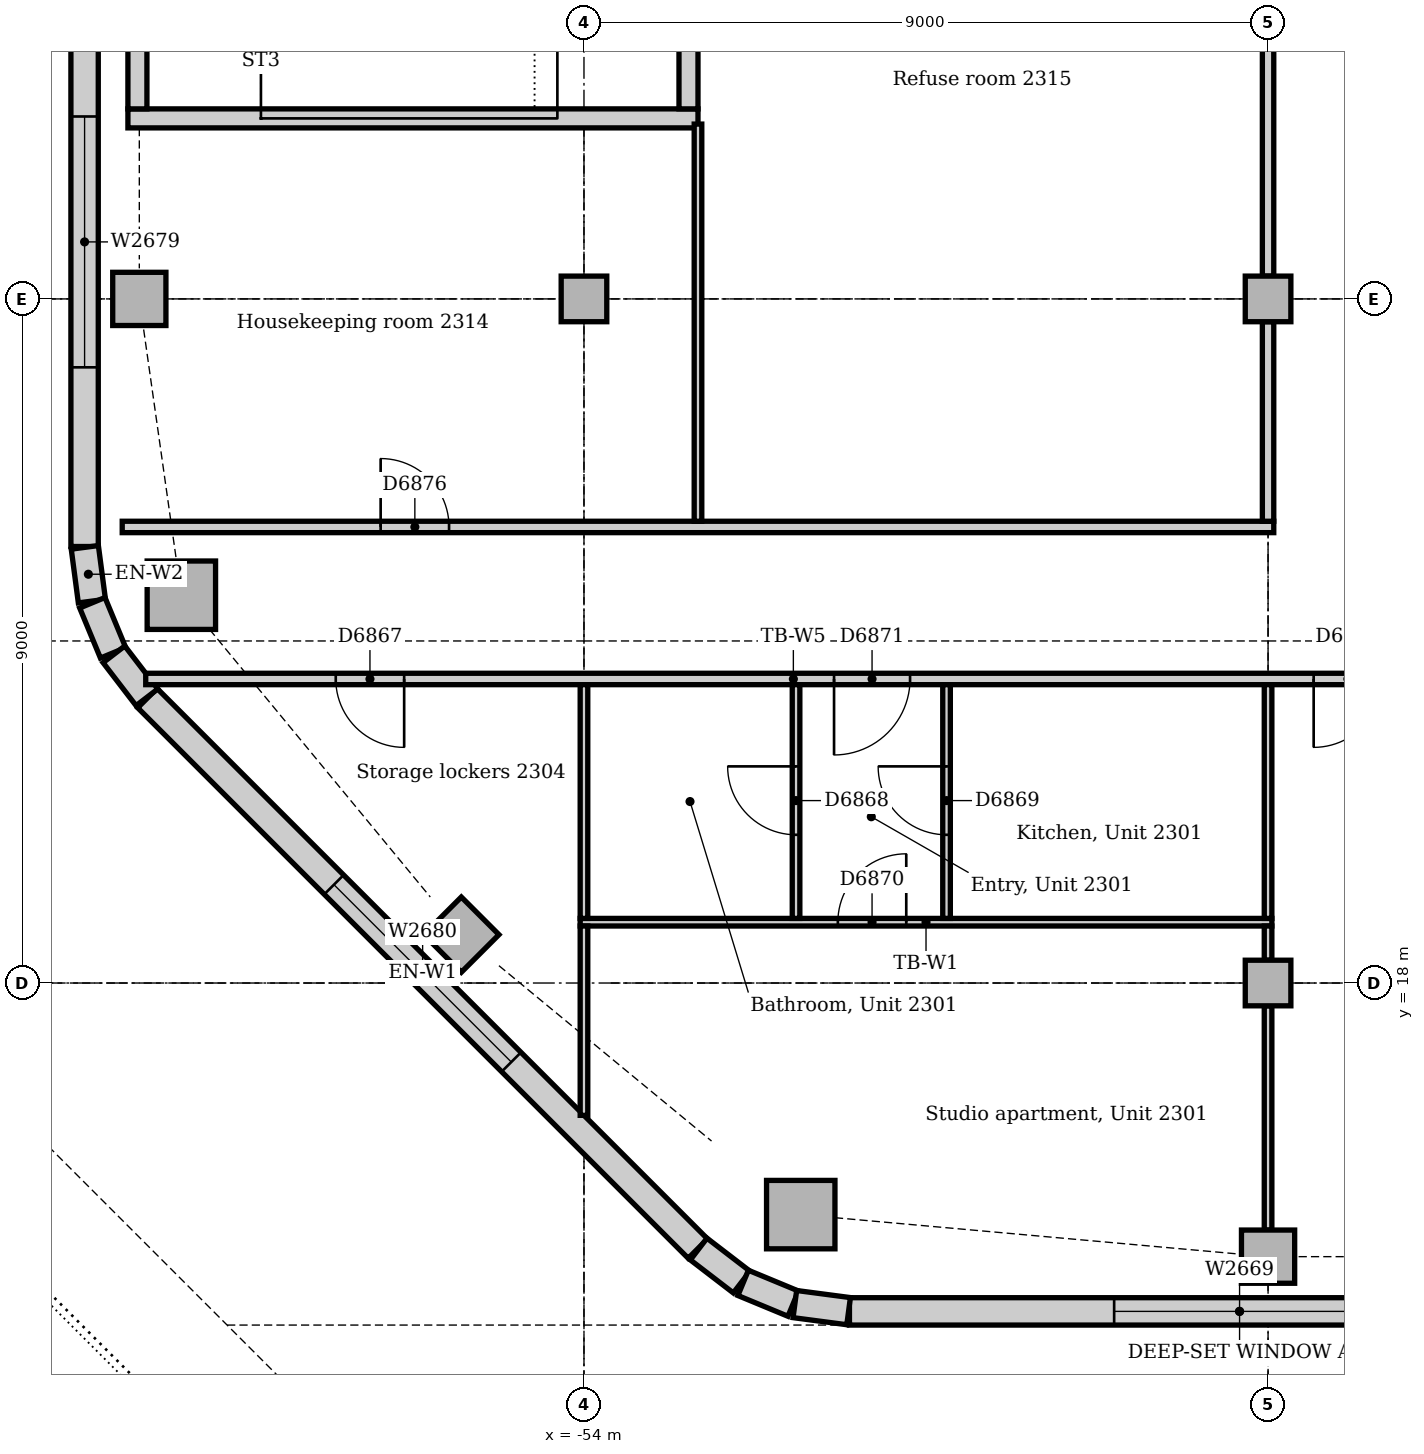
"""IFC4 building model, lengths in metres.
Left out: names, types, materials, properties, quantities, classifications, styles, units other than length and angle.
Written with IfcOpenShell. Run it as: python <this file> out.ifc"""

import sys

from ifc_helpers import new_model, si_unit, direction, frame, frame_2d, origin, origin_2d, place, context, subcontext, project, spatial, rectangle, extrude, element, fill, save


model = new_model("IFC4")
c1 = context("Model", 3, precision=1e-05, world=origin(), true_north=direction((0.0, 1.0)))
c2 = subcontext(c1, "Body", "Model", "MODEL_VIEW")
j1 = project(units=[si_unit("LENGTHUNIT", "METRE"), si_unit("PLANEANGLEUNIT", "RADIAN")], contexts=[c1])
p1 = place(None, origin())
s1 = spatial("IfcSite", under=j1, at=p1, CompositionType="ELEMENT")
p2 = place(p1, origin())
s2 = spatial("IfcBuilding", under=s1, at=p2, CompositionType="ELEMENT")
p3 = place(p2, frame((0.0, 0.0, 100.0)))
s3 = spatial("IfcBuildingStorey", under=s2, at=p3, CompositionType="ELEMENT", Elevation=100.0)
p4 = place(p3, frame((-60.0, 29.375, 0.0), z_axis=(0.0, 0.0, 1.0), x_axis=(1.0, 0.0, 0.0)))
e1 = element("IfcWall", 1, at=p4, inside=s3, PredefinedType="SOLIDWALL", context=c2, shape_type="SweptSolid", body=[
    extrude(rectangle(XDim=7.5, YDim=0.25, at=frame_2d((3.75, 0.0))), origin(), (0.0, 0.0, 1.0), 4.0),
])
for number, where, z_axis, x_axis in (
    (2, (-52.625, 29.5, 0.0), (0.0, 0.0, 1.0), (0.0, 1.0, 0.0)),
    (3, (-59.875, 33.5, 0.0), (0.0, 0.0, 1.0), (0.0, -1.0, 0.0)),
):
    element("IfcWall", number, at=place(p3, frame(where, z_axis=z_axis, x_axis=x_axis)), inside=s3, PredefinedType="SOLIDWALL", context=c2, shape_type="SweptSolid", body=[
        extrude(rectangle(XDim=4.0, YDim=0.25, at=frame_2d((2.0, 0.0))), origin(), (0.0, 0.0, 1.0), 4.0),
    ])
for number, where, z_axis, x_axis in (
    (4, (-51.148, 14.953, -0.15), (0.0, 0.0, 1.0), (1.0, 0.0, 0.0)),
    (5, (-59.297, 23.102, -0.15), (0.0, 0.0, 1.0), (1.0, 0.0, 0.0)),
):
    element("IfcColumn", number, at=place(p3, frame(where, z_axis=z_axis, x_axis=x_axis)), inside=s3, PredefinedType="COLUMN", context=c2, shape_type="SweptSolid", body=[
        extrude(rectangle(XDim=0.9, YDim=0.9, at=origin_2d()), origin(), (0.0, 0.0, 1.0), 4.0),
    ])
for number, where, z_axis, x_axis in (
    (6, (-45.0, 14.4, -0.15), (0.0, 0.0, 1.0), (1.0, 0.0, 0.0)),
    (7, (-59.85, 27.0, -0.15), (0.0, 0.0, 1.0), (1.0, 0.0, 0.0)),
    (8, (-55.614, 18.636, -0.15), (0.0, 0.0, 1.0), (0.707, 0.707, 0.0)),
):
    element("IfcColumn", number, at=place(p3, frame(where, z_axis=z_axis, x_axis=x_axis)), inside=s3, PredefinedType="COLUMN", context=c2, shape_type="SweptSolid", body=[
        extrude(rectangle(XDim=0.7, YDim=0.7, at=origin_2d()), origin(), (0.0, 0.0, 1.0), 4.0),
    ])
for number, where, z_axis, x_axis in (
    (9, (-54.0, 27.0, 0.0), (0.0, 0.0, 1.0), (1.0, 0.0, 0.0)),
    (10, (-45.0, 18.0, 0.0), (0.0, 0.0, 1.0), (1.0, 0.0, 0.0)),
    (11, (-45.0, 27.0, 0.0), (0.0, 0.0, 1.0), (1.0, 0.0, 0.0)),
):
    element("IfcColumn", number, at=place(p3, frame(where, z_axis=z_axis, x_axis=x_axis)), inside=s3, PredefinedType="COLUMN", context=c2, shape_type="SweptSolid", body=[
        extrude(rectangle(XDim=0.6, YDim=0.6, at=origin_2d()), origin(), (0.0, 0.0, 1.0), 3.85),
    ])
p5 = place(p3, frame((-50.507, 13.68, 0.0), z_axis=(0.0, 0.0, 1.0), x_axis=(1.0, 0.0, 0.0)))
e12 = element("IfcWall", 12, at=p5, inside=s3, PredefinedType="STANDARD", context=c2, shape_type="SweptSolid", body=[
    extrude(rectangle(XDim=19.265, YDim=0.36, at=frame_2d((9.632, 0.0))), origin(), (0.0, 0.0, 1.0), 3.85),
])
p6 = place(p5, frame((3.482, 0.0, 0.9)))
e13 = element("IfcOpeningElement", 13, at=p6, cuts=e12, PredefinedType="OPENING", context=c2, shape_type="SweptSolid", body=[
    extrude(rectangle(XDim=3.3, YDim=1.6, at=frame_2d((1.65, 0.8))), frame((0.0, 0.19, 0.0), z_axis=(0.0, -1.0, 0.0), x_axis=(1.0, 0.0, 0.0)), (0.0, 0.0, 1.0), 0.38),
])
p7 = place(p5, frame((8.732, 0.0, 0.0)))
e14 = element("IfcOpeningElement", 14, at=p7, cuts=e12, PredefinedType="OPENING", context=c2, shape_type="SweptSolid", body=[
    extrude(rectangle(XDim=1.8, YDim=2.4, at=frame_2d((0.9, 1.2))), frame((0.0, 0.19, 0.0), z_axis=(0.0, -1.0, 0.0), x_axis=(1.0, 0.0, 0.0)), (0.0, 0.0, 1.0), 0.38),
])
p8 = place(p5, frame((12.482, 0.0, 0.9)))
e15 = element("IfcOpeningElement", 15, at=p8, cuts=e12, PredefinedType="OPENING", context=c2, shape_type="SweptSolid", body=[
    extrude(rectangle(XDim=3.3, YDim=1.6, at=frame_2d((1.65, 0.8))), frame((0.0, 0.19, 0.0), z_axis=(0.0, -1.0, 0.0), x_axis=(1.0, 0.0, 0.0)), (0.0, 0.0, 1.0), 0.38),
])
p9 = place(p3, frame((-60.57, 45.257, 0.0), z_axis=(0.0, 0.0, 1.0), x_axis=(0.0, -1.0, 0.0)))
e16 = element("IfcWall", 16, at=p9, inside=s3, PredefinedType="STANDARD", context=c2, shape_type="SweptSolid", body=[
    extrude(rectangle(XDim=21.515, YDim=0.36, at=frame_2d((10.757, 0.0))), origin(), (0.0, 0.0, 1.0), 3.85),
])
p10 = place(p9, frame((3.107, 0.0, 0.0)))
e17 = element("IfcOpeningElement", 17, at=p10, cuts=e16, PredefinedType="OPENING", context=c2, shape_type="SweptSolid", body=[
    extrude(rectangle(XDim=1.8, YDim=2.4, at=frame_2d((0.9, 1.2))), frame((0.0, 0.19, 0.0), z_axis=(0.0, -1.0, 0.0), x_axis=(1.0, 0.0, 0.0)), (0.0, 0.0, 1.0), 0.38),
])
p11 = place(p9, frame((6.857, 0.0, 0.9)))
e18 = element("IfcOpeningElement", 18, at=p11, cuts=e16, PredefinedType="OPENING", context=c2, shape_type="SweptSolid", body=[
    extrude(rectangle(XDim=3.3, YDim=1.6, at=frame_2d((1.65, 0.8))), frame((0.0, 0.19, 0.0), z_axis=(0.0, -1.0, 0.0), x_axis=(1.0, 0.0, 0.0)), (0.0, 0.0, 1.0), 0.38),
])
p12 = place(p9, frame((11.357, 0.0, 0.9)))
e19 = element("IfcOpeningElement", 19, at=p12, cuts=e16, PredefinedType="OPENING", context=c2, shape_type="SweptSolid", body=[
    extrude(rectangle(XDim=3.3, YDim=1.6, at=frame_2d((1.65, 0.8))), frame((0.0, 0.19, 0.0), z_axis=(0.0, -1.0, 0.0), x_axis=(1.0, 0.0, 0.0)), (0.0, 0.0, 1.0), 0.38),
])
p13 = place(p9, frame((15.857, 0.0, 0.9)))
e20 = element("IfcOpeningElement", 20, at=p13, cuts=e16, PredefinedType="OPENING", context=c2, shape_type="SweptSolid", body=[
    extrude(rectangle(XDim=3.3, YDim=1.6, at=frame_2d((1.65, 0.8))), frame((0.0, 0.19, 0.0), z_axis=(0.0, -1.0, 0.0), x_axis=(1.0, 0.0, 0.0)), (0.0, 0.0, 1.0), 0.38),
])
p14 = place(p3, frame((-59.744, 21.749, 0.0), z_axis=(0.0, 0.0, 1.0), x_axis=(0.707106781187, -0.707106781187, 0.0)))
e21 = element("IfcWall", 21, at=p14, inside=s3, PredefinedType="STANDARD", context=c2, shape_type="SweptSolid", body=[
    extrude(rectangle(XDim=10.243, YDim=0.36, at=frame_2d((5.121, 0.0))), origin(), (0.0, 0.0, 1.0), 3.85),
])
p15 = place(p14, frame((3.471, 0.0, 0.9)))
e22 = element("IfcOpeningElement", 22, at=p15, cuts=e21, PredefinedType="OPENING", context=c2, shape_type="SweptSolid", body=[
    extrude(rectangle(XDim=3.3, YDim=1.6, at=frame_2d((1.65, 0.8))), frame((0.0, 0.19, 0.0), z_axis=(0.0, -1.0, 0.0), x_axis=(1.0, 0.0, 0.0)), (0.0, 0.0, 1.0), 0.38),
])
for number, where, z_axis, x_axis in (
    (23, (-60.567, 23.731, 0.0), (0.0, 0.0, 1.0), (0.131, -0.991, 0.0)),
    (24, (-60.468, 23.003, 0.0), (0.0, 0.0, 1.0), (0.383, -0.924, 0.0)),
):
    element("IfcWall", number, at=place(p3, frame(where, z_axis=z_axis, x_axis=x_axis)), inside=s3, PredefinedType="STANDARD", context=c2, shape_type="SweptSolid", body=[
        extrude(rectangle(XDim=0.713, YDim=0.36, at=frame_2d((0.356, 0.0))), origin(), (0.0, 0.0, 1.0), 3.85),
    ])
for number, where, z_axis, x_axis in (
    (25, (-60.184, 22.325, 0.0), (0.0, 0.0, 1.0), (0.609, -0.793, 0.0)),
    (26, (-52.491, 14.5, 0.0), (0.0, 0.0, 1.0), (0.793, -0.609, 0.0)),
):
    element("IfcWall", number, at=place(p3, frame(where, z_axis=z_axis, x_axis=x_axis)), inside=s3, PredefinedType="STANDARD", context=c2, shape_type="SweptSolid", body=[
        extrude(rectangle(XDim=0.713, YDim=0.36, at=frame_2d((0.357, 0.0))), origin(), (0.0, 0.0, 1.0), 3.85),
    ])
for number, where, z_axis, x_axis in (
    (27, (-51.906, 14.055, 0.0), (0.0, 0.0, 1.0), (0.924, -0.383, 0.0)),
    (28, (-51.226, 13.776, 0.0), (0.0, 0.0, 1.0), (0.991, -0.131, 0.0)),
):
    element("IfcWall", number, at=place(p3, frame(where, z_axis=z_axis, x_axis=x_axis)), inside=s3, PredefinedType="STANDARD", context=c2, shape_type="SweptSolid", body=[
        extrude(rectangle(XDim=0.713, YDim=0.36, at=frame_2d((0.356, 0.0))), origin(), (0.0, 0.0, 1.0), 3.85),
    ])
p16 = place(p3, frame((-59.766, 22.0, 0.0), z_axis=(0.0, 0.0, 1.0), x_axis=(1.0, 0.0, 0.0)))
e29 = element("IfcWall", 29, at=p16, inside=s3, PredefinedType="PARTITIONING", context=c2, shape_type="SweptSolid", body=[
    extrude(rectangle(XDim=17.041, YDim=0.15, at=frame_2d((8.52, 0.0))), origin(), (0.0, 0.0, 1.0), 3.85),
])
p17 = place(p16, frame((15.366, 0.0, 0.0)))
e30 = element("IfcOpeningElement", 30, at=p17, cuts=e29, PredefinedType="OPENING", context=c2, shape_type="SweptSolid", body=[
    extrude(rectangle(XDim=0.9, YDim=2.1, at=frame_2d((0.45, 1.05))), frame((0.0, 0.085, 0.0), z_axis=(0.0, -1.0, 0.0), x_axis=(1.0, 0.0, 0.0)), (0.0, 0.0, 1.0), 0.17),
])
p18 = place(p16, frame((2.5, 0.0, 0.0)))
e31 = element("IfcOpeningElement", 31, at=p18, cuts=e29, PredefinedType="OPENING", context=c2, shape_type="SweptSolid", body=[
    extrude(rectangle(XDim=0.9, YDim=2.1, at=frame_2d((0.45, 1.05))), frame((0.0, 0.085, 0.0), z_axis=(0.0, -1.0, 0.0), x_axis=(1.0, 0.0, 0.0)), (0.0, 0.0, 1.0), 0.17),
])
p19 = place(p16, frame((9.056, 0.0, 0.0)))
e32 = element("IfcOpeningElement", 32, at=p19, cuts=e29, PredefinedType="OPENING", context=c2, shape_type="SweptSolid", body=[
    extrude(rectangle(XDim=1.0, YDim=2.1, at=frame_2d((0.5, 1.05))), frame((0.0, 0.085, 0.0), z_axis=(0.0, -1.0, 0.0), x_axis=(1.0, 0.0, 0.0)), (0.0, 0.0, 1.0), 0.17),
])
p20 = place(p3, frame((-60.075, 24.0, 0.0), z_axis=(0.0, 0.0, 1.0), x_axis=(1.0, 0.0, 0.0)))
e33 = element("IfcWall", 33, at=p20, inside=s3, PredefinedType="PARTITIONING", context=c2, shape_type="SweptSolid", body=[
    extrude(rectangle(XDim=15.15, YDim=0.15, at=frame_2d((7.575, 0.0))), origin(), (0.0, 0.0, 1.0), 3.85),
])
p21 = place(p20, frame((3.4, 0.0, 0.0)))
e34 = element("IfcOpeningElement", 34, at=p21, cuts=e33, PredefinedType="OPENING", context=c2, shape_type="SweptSolid", body=[
    extrude(rectangle(XDim=0.9, YDim=2.1, at=frame_2d((0.45, 1.05))), frame((0.0, 0.085, 0.0), z_axis=(0.0, -1.0, 0.0), x_axis=(1.0, 0.0, 0.0)), (0.0, 0.0, 1.0), 0.17),
])
p22 = place(p3, frame((-45.0, 24.075, 0.0), z_axis=(0.0, 0.0, 1.0), x_axis=(0.0, 1.0, 0.0)))
e35 = element("IfcWall", 35, at=p22, inside=s3, PredefinedType="PARTITIONING", context=c2, shape_type="SweptSolid", body=[
    extrude(rectangle(XDim=2.625, YDim=0.15, at=frame_2d((1.312, 0.0))), origin(), (0.0, 0.0, 1.0), 3.362),
])
p23 = place(p3, frame((-45.0, 27.3, 0.0), z_axis=(0.0, 0.0, 1.0), x_axis=(0.0, 1.0, 0.0)))
e36 = element("IfcWall", 36, at=p23, inside=s3, PredefinedType="PARTITIONING", context=c2, shape_type="SweptSolid", body=[
    extrude(rectangle(XDim=6.675, YDim=0.15, at=frame_2d((3.337, 0.0))), origin(), (0.0, 0.0, 1.0), 3.362),
])
p24 = place(p3, frame((-54.05, 18.8, 0.0), z_axis=(0.0, 0.0, 1.0), x_axis=(1.0, 0.0, 0.0)))
e37 = element("IfcWall", 37, at=p24, inside=s3, PredefinedType="PARTITIONING", context=c2, shape_type="SweptSolid", body=[
    extrude(rectangle(XDim=9.1, YDim=0.1, at=frame_2d((4.55, 0.0))), origin(), (0.0, 0.0, 1.0), 3.85),
])
p25 = place(p24, frame((3.39, 0.0, 0.0)))
e38 = element("IfcOpeningElement", 38, at=p25, cuts=e37, PredefinedType="OPENING", context=c2, shape_type="SweptSolid", body=[
    extrude(rectangle(XDim=0.9, YDim=2.1, at=frame_2d((0.45, 1.05))), frame((0.0, 0.06, 0.0), z_axis=(0.0, -1.0, 0.0), x_axis=(1.0, 0.0, 0.0)), (0.0, 0.0, 1.0), 0.12),
])
p26 = place(p3, frame((-45.0, 18.85, 0.0), z_axis=(0.0, 0.0, 1.0), x_axis=(0.0, 1.0, 0.0)))
e39 = element("IfcWall", 39, at=p26, inside=s3, PredefinedType="PARTITIONING", context=c2, shape_type="SweptSolid", body=[
    extrude(rectangle(XDim=3.075, YDim=0.1, at=frame_2d((1.538, 0.0))), origin(), (0.0, 0.0, 1.0), 3.362),
])
p27 = place(p3, frame((-45.0, 18.3, 0.0), z_axis=(0.0, 0.0, 1.0), x_axis=(0.0, 1.0, 0.0)))
e40 = element("IfcWall", 40, at=p27, inside=s3, PredefinedType="PARTITIONING", context=c2, shape_type="SweptSolid", body=[
    extrude(rectangle(XDim=0.45, YDim=0.1, at=frame_2d((0.225, 0.0))), origin(), (0.0, 0.0, 1.0), 3.85),
])
p28 = place(p3, frame((-45.0, 14.75, 0.0), z_axis=(0.0, 0.0, 1.0), x_axis=(0.0, 1.0, 0.0)))
e41 = element("IfcWall", 41, at=p28, inside=s3, PredefinedType="PARTITIONING", context=c2, shape_type="SweptSolid", body=[
    extrude(rectangle(XDim=2.95, YDim=0.1, at=frame_2d((1.475, 0.0))), origin(), (0.0, 0.0, 1.0), 3.652),
])
p29 = place(p3, frame((-54.0, 18.85, 0.0), z_axis=(0.0, 0.0, 1.0), x_axis=(0.0, 1.0, 0.0)))
e42 = element("IfcWall", 42, at=p29, inside=s3, PredefinedType="PARTITIONING", context=c2, shape_type="SweptSolid", body=[
    extrude(rectangle(XDim=3.075, YDim=0.1, at=frame_2d((1.538, 0.0))), origin(), (0.0, 0.0, 1.0), 3.362),
])
p30 = place(p3, frame((-54.0, 16.259, 0.0), z_axis=(0.0, 0.0, 1.0), x_axis=(0.0, 1.0, 0.0)))
e43 = element("IfcWall", 43, at=p30, inside=s3, PredefinedType="PARTITIONING", context=c2, shape_type="SweptSolid", body=[
    extrude(rectangle(XDim=2.491, YDim=0.1, at=frame_2d((1.245, 0.0))), origin(), (0.0, 0.0, 1.0), 3.362),
])
p31 = place(p3, frame((-52.5, 24.075, 0.0), z_axis=(0.0, 0.0, 1.0), x_axis=(0.0, 1.0, 0.0)))
e44 = element("IfcWall", 44, at=p31, inside=s3, PredefinedType="PARTITIONING", context=c2, shape_type="SweptSolid", body=[
    extrude(rectangle(XDim=5.225, YDim=0.1, at=frame_2d((2.612, 0.0))), origin(), (0.0, 0.0, 1.0), 3.85),
])
p32 = place(p3, frame((-51.21, 18.85, 0.0), z_axis=(0.0, 0.0, 1.0), x_axis=(0.0, 1.0, 0.0)))
e45 = element("IfcWall", 45, at=p32, inside=s3, PredefinedType="PARTITIONING", context=c2, shape_type="SweptSolid", body=[
    extrude(rectangle(XDim=3.075, YDim=0.1, at=frame_2d((1.538, 0.0))), origin(), (0.0, 0.0, 1.0), 3.85),
])
p33 = place(p32, frame((1.1, 0.0, 0.0)))
e46 = element("IfcOpeningElement", 46, at=p33, cuts=e45, PredefinedType="OPENING", context=c2, shape_type="SweptSolid", body=[
    extrude(rectangle(XDim=0.9, YDim=2.1, at=frame_2d((0.45, 1.05))), frame((0.0, 0.06, 0.0), z_axis=(0.0, -1.0, 0.0), x_axis=(1.0, 0.0, 0.0)), (0.0, 0.0, 1.0), 0.12),
])
p34 = place(p3, frame((-49.23, 18.85, 0.0), z_axis=(0.0, 0.0, 1.0), x_axis=(0.0, 1.0, 0.0)))
e47 = element("IfcWall", 47, at=p34, inside=s3, PredefinedType="PARTITIONING", context=c2, shape_type="SweptSolid", body=[
    extrude(rectangle(XDim=3.075, YDim=0.1, at=frame_2d((1.538, 0.0))), origin(), (0.0, 0.0, 1.0), 3.85),
])
p35 = place(p34, frame((1.1, 0.0, 0.0)))
e48 = element("IfcOpeningElement", 48, at=p35, cuts=e47, PredefinedType="OPENING", context=c2, shape_type="SweptSolid", body=[
    extrude(rectangle(XDim=0.9, YDim=2.1, at=frame_2d((0.45, 1.05))), frame((0.0, 0.06, 0.0), z_axis=(0.0, -1.0, 0.0), x_axis=(1.0, 0.0, 0.0)), (0.0, 0.0, 1.0), 0.12),
])
p36 = place(p6, origin())
e49 = element("IfcWindow", 49, at=p36, inside=s3, PartitioningType="SINGLE_PANEL", PredefinedType="WINDOW", context=c2, shape_type="SweptSolid", body=[
    extrude(rectangle(XDim=3.3, YDim=1.6, at=frame_2d((1.65, 0.8))), frame((0.0, 0.13, 0.0), z_axis=(0.0, -1.0, 0.0), x_axis=(1.0, 0.0, 0.0)), (0.0, 0.0, 1.0), 0.06),
])
fill(e13, e49)
p37 = place(p13, origin())
e50 = element("IfcWindow", 50, at=p37, inside=s3, PartitioningType="SINGLE_PANEL", PredefinedType="WINDOW", context=c2, shape_type="SweptSolid", body=[
    extrude(rectangle(XDim=3.3, YDim=1.6, at=frame_2d((1.65, 0.8))), frame((0.0, 0.13, 0.0), z_axis=(0.0, -1.0, 0.0), x_axis=(1.0, 0.0, 0.0)), (0.0, 0.0, 1.0), 0.06),
])
fill(e20, e50)
p38 = place(p15, origin())
e51 = element("IfcWindow", 51, at=p38, inside=s3, PartitioningType="SINGLE_PANEL", PredefinedType="WINDOW", context=c2, shape_type="SweptSolid", body=[
    extrude(rectangle(XDim=3.3, YDim=1.6, at=frame_2d((1.65, 0.8))), frame((0.0, 0.13, 0.0), z_axis=(0.0, -1.0, 0.0), x_axis=(1.0, 0.0, 0.0)), (0.0, 0.0, 1.0), 0.06),
])
fill(e22, e51)
p39 = place(p17, frame((0.9, 0.0, 0.0), z_axis=(0.0, 0.0, 1.0), x_axis=(-1.0, 0.0, 0.0)))
e52 = element("IfcDoor", 52, at=p39, inside=s3, OperationType="SINGLE_SWING_RIGHT", PredefinedType="DOOR", context=c2, shape_type="SweptSolid", body=[
    extrude(rectangle(XDim=0.9, YDim=2.1, at=frame_2d((0.45, 1.05))), frame((0.0, 0.025, 0.0), z_axis=(0.0, -1.0, 0.0), x_axis=(1.0, 0.0, 0.0)), (0.0, 0.0, 1.0), 0.05),
])
fill(e30, e52)
p40 = place(p18, frame((0.9, 0.0, 0.0), z_axis=(0.0, 0.0, 1.0), x_axis=(-1.0, 0.0, 0.0)))
e53 = element("IfcDoor", 53, at=p40, inside=s3, OperationType="SINGLE_SWING_LEFT", PredefinedType="DOOR", context=c2, shape_type="SweptSolid", body=[
    extrude(rectangle(XDim=0.9, YDim=2.1, at=frame_2d((0.45, 1.05))), frame((0.0, 0.025, 0.0), z_axis=(0.0, -1.0, 0.0), x_axis=(1.0, 0.0, 0.0)), (0.0, 0.0, 1.0), 0.05),
])
fill(e31, e53)
p41 = place(p33, origin())
e54 = element("IfcDoor", 54, at=p41, inside=s3, OperationType="SINGLE_SWING_RIGHT", PredefinedType="DOOR", context=c2, shape_type="SweptSolid", body=[
    extrude(rectangle(XDim=0.9, YDim=2.1, at=frame_2d((0.45, 1.05))), frame((0.0, 0.025, 0.0), z_axis=(0.0, -1.0, 0.0), x_axis=(1.0, 0.0, 0.0)), (0.0, 0.0, 1.0), 0.05),
])
fill(e46, e54)
p42 = place(p35, origin())
e55 = element("IfcDoor", 55, at=p42, inside=s3, OperationType="SINGLE_SWING_RIGHT", PredefinedType="DOOR", context=c2, shape_type="SweptSolid", body=[
    extrude(rectangle(XDim=0.9, YDim=2.1, at=frame_2d((0.45, 1.05))), frame((0.0, 0.025, 0.0), z_axis=(0.0, -1.0, 0.0), x_axis=(1.0, 0.0, 0.0)), (0.0, 0.0, 1.0), 0.05),
])
fill(e48, e55)
p43 = place(p25, origin())
e56 = element("IfcDoor", 56, at=p43, inside=s3, OperationType="SINGLE_SWING_RIGHT", PredefinedType="DOOR", context=c2, shape_type="SweptSolid", body=[
    extrude(rectangle(XDim=0.9, YDim=2.1, at=frame_2d((0.45, 1.05))), frame((0.0, 0.025, 0.0), z_axis=(0.0, -1.0, 0.0), x_axis=(1.0, 0.0, 0.0)), (0.0, 0.0, 1.0), 0.05),
])
fill(e38, e56)
p44 = place(p19, frame((1.0, 0.0, 0.0), z_axis=(0.0, 0.0, 1.0), x_axis=(-1.0, 0.0, 0.0)))
e57 = element("IfcDoor", 57, at=p44, inside=s3, OperationType="SINGLE_SWING_RIGHT", PredefinedType="DOOR", context=c2, shape_type="SweptSolid", body=[
    extrude(rectangle(XDim=1.0, YDim=2.1, at=frame_2d((0.5, 1.05))), frame((0.0, 0.025, 0.0), z_axis=(0.0, -1.0, 0.0), x_axis=(1.0, 0.0, 0.0)), (0.0, 0.0, 1.0), 0.05),
])
fill(e32, e57)
p45 = place(p21, origin())
e58 = element("IfcDoor", 58, at=p45, inside=s3, OperationType="SINGLE_SWING_LEFT", PredefinedType="DOOR", context=c2, shape_type="SweptSolid", body=[
    extrude(rectangle(XDim=0.9, YDim=2.1, at=frame_2d((0.45, 1.05))), frame((0.0, 0.025, 0.0), z_axis=(0.0, -1.0, 0.0), x_axis=(1.0, 0.0, 0.0)), (0.0, 0.0, 1.0), 0.05),
])
fill(e34, e58)
save(model, sys.argv[1])
